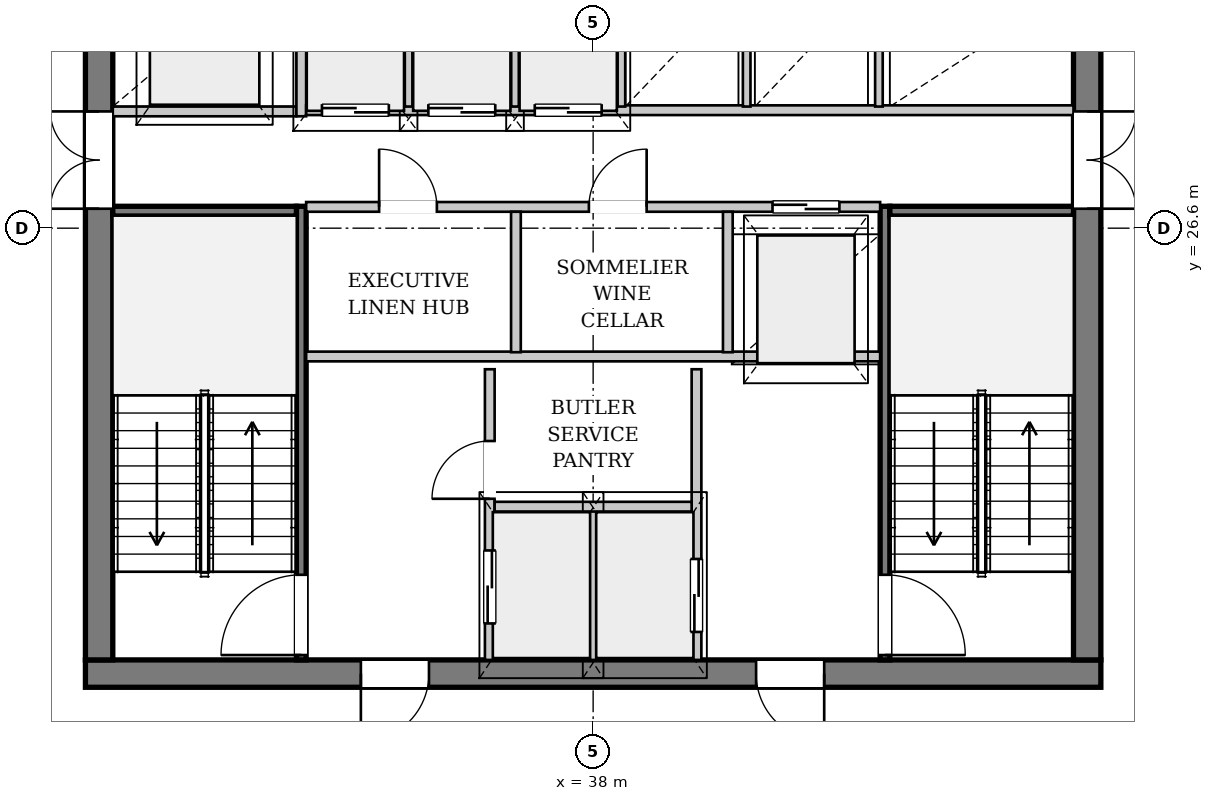
"""IFC4 building model, lengths in metres.
Left out: names, types, materials, properties, quantities, classifications, styles, units other than length and angle.
Written with IfcOpenShell. Run it as: python <this file> out.ifc"""

import sys

from ifc_helpers import new_model, si_unit, direction, frame, frame_2d, origin, place, context, subcontext, project, spatial, rectangle, extrude, source, transform, mapped, element, fill, save


model = new_model("IFC4")
c1 = context("Model", 3, precision=1e-05, world=origin(), true_north=direction((0.0, 1.0)))
c2 = subcontext(c1, "Body", "Model", "MODEL_VIEW")
j1 = project(units=[si_unit("LENGTHUNIT", "METRE"), si_unit("PLANEANGLEUNIT", "RADIAN")], contexts=[c1])
p1 = place(None, origin())
s1 = spatial("IfcSite", under=j1, at=p1, CompositionType="ELEMENT")
p2 = place(p1, origin())
s2 = spatial("IfcBuilding", under=s1, at=p2, CompositionType="ELEMENT")
p3 = place(p2, frame((0.0, 0.0, 241.7)))
s3 = spatial("IfcBuildingStorey", under=s2, at=p3, CompositionType="ELEMENT", Elevation=241.7)
p4 = place(p3, frame((52.382, 25.451, 0.0), z_axis=(0.0, 0.0, 1.0), x_axis=(-0.354101826289, -0.935206873702, 0.0)))
e1 = element("IfcWall", 1, at=p4, inside=s3, PredefinedType="SOLIDWALL", context=c2, shape_type="SweptSolid", body=[
    extrude(rectangle(XDim=22.732, YDim=0.32, at=frame_2d((11.366, 0.0))), origin(), (0.0, 0.0, 1.0), 2.872),
])
p5 = place(p4, frame((6.524, 0.0, 0.0)))
e2 = element("IfcOpeningElement", 2, at=p5, cuts=e1, PredefinedType="OPENING", context=c2, shape_type="SweptSolid", body=[
    extrude(rectangle(XDim=1.5, YDim=2.3, at=frame_2d((0.75, 1.15))), frame((0.0, 0.17, 0.0), z_axis=(0.0, -1.0, 0.0), x_axis=(1.0, 0.0, 0.0)), (0.0, 0.0, 1.0), 0.34),
])
p6 = place(p4, frame((15.521, 0.0, 0.402)))
e3 = element("IfcOpeningElement", 3, at=p6, cuts=e1, PredefinedType="OPENING", context=c2, shape_type="SweptSolid", body=[
    extrude(rectangle(XDim=2.6, YDim=2.35, at=frame_2d((1.3, 1.175))), frame((0.0, 0.17, 0.0), z_axis=(0.0, -1.0, 0.0), x_axis=(1.0, 0.0, 0.0)), (0.0, 0.0, 1.0), 0.34),
])
p7 = place(p3, frame((15.555, 29.152, 0.0), z_axis=(0.0, 0.0, 1.0), x_axis=(0.848386889954, 0.52937669476, 0.0)))
e4 = element("IfcWall", 4, at=p7, inside=s3, PredefinedType="SOLIDWALL", context=c2, shape_type="SweptSolid", body=[
    extrude(rectangle(XDim=22.188, YDim=0.38, at=frame_2d((11.094, 0.0))), origin(), (0.0, 0.0, 1.0), 2.872),
])
p8 = place(p7, frame((5.113, 0.0, 0.502)))
e5 = element("IfcOpeningElement", 5, at=p8, cuts=e4, PredefinedType="OPENING", context=c2, shape_type="SweptSolid", body=[
    extrude(rectangle(XDim=2.2, YDim=2.25, at=frame_2d((1.1, 1.125))), frame((0.0, 0.2, 0.0), z_axis=(0.0, -1.0, 0.0), x_axis=(1.0, 0.0, 0.0)), (0.0, 0.0, 1.0), 0.4),
])
p9 = place(p7, frame((14.876, 0.0, 0.502)))
e6 = element("IfcOpeningElement", 6, at=p9, cuts=e4, PredefinedType="OPENING", context=c2, shape_type="SweptSolid", body=[
    extrude(rectangle(XDim=2.2, YDim=2.25, at=frame_2d((1.1, 1.125))), frame((0.0, 0.2, 0.0), z_axis=(0.0, -1.0, 0.0), x_axis=(1.0, 0.0, 0.0)), (0.0, 0.0, 1.0), 0.4),
])
p10 = place(p3, frame((45.465, 4.559, 0.0), z_axis=(0.0, 0.0, 1.0), x_axis=(0.349367033566, 0.93698595286, 0.0)))
e7 = element("IfcWall", 7, at=p10, inside=s3, PredefinedType="PARAPET", context=c2, shape_type="SweptSolid", body=[
    extrude(rectangle(XDim=20.267, YDim=0.22, at=frame_2d((10.133, 0.0))), origin(), (0.0, 0.0, 1.0), 0.3),
])
p11 = place(p3, frame((46.35, 19.275, 0.0), z_axis=(0.0, 0.0, 1.0), x_axis=(-1.0, 0.0, 0.0)))
e8 = element("IfcWall", 8, at=p11, inside=s3, PredefinedType="SHEAR", context=c2, shape_type="SweptSolid", body=[
    extrude(rectangle(XDim=16.7, YDim=0.45, at=frame_2d((8.35, 0.0))), origin(), (0.0, 0.0, 1.0), 3.38),
])
p12 = place(p11, frame((4.55, 0.0, 0.0)))
e9 = element("IfcOpeningElement", 9, at=p12, cuts=e8, PredefinedType="OPENING", context=c2, shape_type="SweptSolid", body=[
    extrude(rectangle(XDim=1.12, YDim=2.25, at=frame_2d((0.56, 1.125))), frame((0.0, 0.235, 0.0), z_axis=(0.0, -1.0, 0.0), x_axis=(1.0, 0.0, 0.0)), (0.0, 0.0, 1.0), 0.47),
])
p13 = place(p11, frame((11.05, 0.0, 0.0)))
e10 = element("IfcOpeningElement", 10, at=p13, cuts=e8, PredefinedType="OPENING", context=c2, shape_type="SweptSolid", body=[
    extrude(rectangle(XDim=1.12, YDim=2.25, at=frame_2d((0.56, 1.125))), frame((0.0, 0.235, 0.0), z_axis=(0.0, -1.0, 0.0), x_axis=(1.0, 0.0, 0.0)), (0.0, 0.0, 1.0), 0.47),
])
p14 = place(p3, frame((29.875, 19.5, 0.0), z_axis=(0.0, 0.0, 1.0), x_axis=(0.0, 1.0, 0.0)))
e11 = element("IfcWall", 11, at=p14, inside=s3, PredefinedType="SHEAR", context=c2, shape_type="SweptSolid", body=[
    extrude(rectangle(XDim=14.2, YDim=0.45, at=frame_2d((7.1, 0.0))), origin(), (0.0, 0.0, 1.0), 3.38),
])
p15 = place(p14, frame((7.42, 0.0, 0.0)))
e12 = element("IfcOpeningElement", 12, at=p15, cuts=e11, PredefinedType="OPENING", context=c2, shape_type="SweptSolid", body=[
    extrude(rectangle(XDim=1.6, YDim=2.2, at=frame_2d((0.8, 1.1))), frame((0.0, 0.235, 0.0), z_axis=(0.0, -1.0, 0.0), x_axis=(1.0, 0.0, 0.0)), (0.0, 0.0, 1.0), 0.47),
])
p16 = place(p3, frame((46.125, 33.7, 0.0), z_axis=(0.0, 0.0, 1.0), x_axis=(0.0, -1.0, 0.0)))
e13 = element("IfcWall", 13, at=p16, inside=s3, PredefinedType="SHEAR", context=c2, shape_type="SweptSolid", body=[
    extrude(rectangle(XDim=14.2, YDim=0.45, at=frame_2d((7.1, 0.0))), origin(), (0.0, 0.0, 1.0), 3.38),
])
p17 = place(p16, frame((5.18, 0.0, 0.0)))
e14 = element("IfcOpeningElement", 14, at=p17, cuts=e13, PredefinedType="OPENING", context=c2, shape_type="SweptSolid", body=[
    extrude(rectangle(XDim=1.6, YDim=2.2, at=frame_2d((0.8, 1.1))), frame((0.0, 0.235, 0.0), z_axis=(0.0, -1.0, 0.0), x_axis=(1.0, 0.0, 0.0)), (0.0, 0.0, 1.0), 0.47),
])
p18 = place(p16, frame((2.05, 0.0, 0.0)))
e15 = element("IfcOpeningElement", 15, at=p18, cuts=e13, PredefinedType="OPENING", context=c2, shape_type="SweptSolid", body=[
    extrude(rectangle(XDim=0.95, YDim=2.1, at=frame_2d((0.475, 1.05))), frame((0.0, 0.235, 0.0), z_axis=(0.0, -1.0, 0.0), x_axis=(1.0, 0.0, 0.0)), (0.0, 0.0, 1.0), 0.47),
])
p19 = place(p3, frame((33.2, 19.5, 0.0), z_axis=(0.0, 0.0, 1.0), x_axis=(0.0, 1.0, 0.0)))
e16 = element("IfcWall", 16, at=p19, inside=s3, PredefinedType="PARTITIONING", context=c2, shape_type="SweptSolid", body=[
    extrude(rectangle(XDim=7.46, YDim=0.16, at=frame_2d((3.73, 0.0))), origin(), (0.0, 0.0, 1.0), 3.38),
])
p20 = place(p19, frame((0.08, 0.0, 0.0)))
e17 = element("IfcOpeningElement", 17, at=p20, cuts=e16, PredefinedType="OPENING", context=c2, shape_type="SweptSolid", body=[
    extrude(rectangle(XDim=1.32, YDim=2.2, at=frame_2d((0.66, 1.1))), frame((0.0, 0.09, 0.0), z_axis=(0.0, -1.0, 0.0), x_axis=(1.0, 0.0, 0.0)), (0.0, 0.0, 1.0), 0.18),
])
p21 = place(p3, frame((30.1, 26.88, 0.0), z_axis=(0.0, 0.0, 1.0), x_axis=(1.0, 0.0, 0.0)))
e18 = element("IfcWall", 18, at=p21, inside=s3, PredefinedType="PARTITIONING", context=c2, shape_type="SweptSolid", body=[
    extrude(rectangle(XDim=3.02, YDim=0.16, at=frame_2d((1.51, 0.0))), origin(), (0.0, 0.0, 1.0), 3.38),
])
p22 = place(p3, frame((42.8, 26.96, 0.0), z_axis=(0.0, 0.0, 1.0), x_axis=(0.0, -1.0, 0.0)))
e19 = element("IfcWall", 19, at=p22, inside=s3, PredefinedType="PARTITIONING", context=c2, shape_type="SweptSolid", body=[
    extrude(rectangle(XDim=7.46, YDim=0.16, at=frame_2d((3.73, 0.0))), origin(), (0.0, 0.0, 1.0), 3.38),
])
p23 = place(p22, frame((6.06, 0.0, 0.0)))
e20 = element("IfcOpeningElement", 20, at=p23, cuts=e19, PredefinedType="OPENING", context=c2, shape_type="SweptSolid", body=[
    extrude(rectangle(XDim=1.32, YDim=2.2, at=frame_2d((0.66, 1.1))), frame((0.0, 0.09, 0.0), z_axis=(0.0, -1.0, 0.0), x_axis=(1.0, 0.0, 0.0)), (0.0, 0.0, 1.0), 0.18),
])
p24 = place(p3, frame((42.88, 26.88, 0.0), z_axis=(0.0, 0.0, 1.0), x_axis=(1.0, 0.0, 0.0)))
e21 = element("IfcWall", 21, at=p24, inside=s3, PredefinedType="PARTITIONING", context=c2, shape_type="SweptSolid", body=[
    extrude(rectangle(XDim=3.02, YDim=0.16, at=frame_2d((1.51, 0.0))), origin(), (0.0, 0.0, 1.0), 3.38),
])
p25 = place(p3, frame((36.3, 19.5, 0.0), z_axis=(0.0, 0.0, 1.0), x_axis=(0.0, 1.0, 0.0)))
e22 = element("IfcWall", 22, at=p25, inside=s3, PredefinedType="PARTITIONING", context=c2, shape_type="SweptSolid", body=[
    extrude(rectangle(XDim=4.78, YDim=0.16, at=frame_2d((2.39, 0.0))), origin(), (0.0, 0.0, 1.0), 3.38),
])
p26 = place(p25, frame((0.6, 0.0, 0.0)))
e23 = element("IfcOpeningElement", 23, at=p26, cuts=e22, PredefinedType="OPENING", context=c2, shape_type="SweptSolid", body=[
    extrude(rectangle(XDim=1.2, YDim=2.2, at=frame_2d((0.6, 1.1))), frame((0.0, 0.09, 0.0), z_axis=(0.0, -1.0, 0.0), x_axis=(1.0, 0.0, 0.0)), (0.0, 0.0, 1.0), 0.18),
])
p27 = place(p25, frame((2.65, 0.0, 0.0)))
e24 = element("IfcOpeningElement", 24, at=p27, cuts=e22, PredefinedType="OPENING", context=c2, shape_type="SweptSolid", body=[
    extrude(rectangle(XDim=0.95, YDim=2.1, at=frame_2d((0.475, 1.05))), frame((0.0, 0.09, 0.0), z_axis=(0.0, -1.0, 0.0), x_axis=(1.0, 0.0, 0.0)), (0.0, 0.0, 1.0), 0.18),
])
p28 = place(p3, frame((39.7, 24.28, 0.0), z_axis=(0.0, 0.0, 1.0), x_axis=(0.0, -1.0, 0.0)))
e25 = element("IfcWall", 25, at=p28, inside=s3, PredefinedType="PARTITIONING", context=c2, shape_type="SweptSolid", body=[
    extrude(rectangle(XDim=4.78, YDim=0.16, at=frame_2d((2.39, 0.0))), origin(), (0.0, 0.0, 1.0), 3.38),
])
p29 = place(p28, frame((3.12, 0.0, 0.0)))
e26 = element("IfcOpeningElement", 26, at=p29, cuts=e25, PredefinedType="OPENING", context=c2, shape_type="SweptSolid", body=[
    extrude(rectangle(XDim=1.2, YDim=2.2, at=frame_2d((0.6, 1.1))), frame((0.0, 0.09, 0.0), z_axis=(0.0, -1.0, 0.0), x_axis=(1.0, 0.0, 0.0)), (0.0, 0.0, 1.0), 0.18),
])
p30 = place(p3, frame((38.0, 19.5, 0.0), z_axis=(0.0, 0.0, 1.0), x_axis=(0.0, 1.0, 0.0)))
e27 = element("IfcWall", 27, at=p30, inside=s3, PredefinedType="PARTITIONING", context=c2, shape_type="SweptSolid", body=[
    extrude(rectangle(XDim=2.46, YDim=0.125, at=frame_2d((1.23, 0.0))), origin(), (0.0, 0.0, 1.0), 3.38),
])
p31 = place(p3, frame((36.38, 22.02, 0.0), z_axis=(0.0, 0.0, 1.0), x_axis=(1.0, 0.0, 0.0)))
e28 = element("IfcWall", 28, at=p31, inside=s3, PredefinedType="PARTITIONING", context=c2, shape_type="SweptSolid", body=[
    extrude(rectangle(XDim=3.24, YDim=0.16, at=frame_2d((1.62, 0.0))), origin(), (0.0, 0.0, 1.0), 3.38),
])
p32 = place(p3, frame((33.28, 24.49, 0.0), z_axis=(0.0, 0.0, 1.0), x_axis=(1.0, 0.0, 0.0)))
e29 = element("IfcWall", 29, at=p32, inside=s3, PredefinedType="PARTITIONING", context=c2, shape_type="SweptSolid", body=[
    extrude(rectangle(XDim=9.44, YDim=0.16, at=frame_2d((4.72, 0.0))), origin(), (0.0, 0.0, 1.0), 3.38),
])
p33 = place(p3, frame((30.1, 28.52, 0.0), z_axis=(0.0, 0.0, 1.0), x_axis=(1.0, 0.0, 0.0)))
e30 = element("IfcWall", 30, at=p33, inside=s3, PredefinedType="PARTITIONING", context=c2, shape_type="SweptSolid", body=[
    extrude(rectangle(XDim=3.02, YDim=0.16, at=frame_2d((1.51, 0.0))), origin(), (0.0, 0.0, 1.0), 3.38),
])
p34 = place(p3, frame((33.2, 28.44, 0.0), z_axis=(0.0, 0.0, 1.0), x_axis=(0.0, 1.0, 0.0)))
e31 = element("IfcWall", 31, at=p34, inside=s3, PredefinedType="PARTITIONING", context=c2, shape_type="SweptSolid", body=[
    extrude(rectangle(XDim=5.26, YDim=0.16, at=frame_2d((2.63, 0.0))), origin(), (0.0, 0.0, 1.0), 3.38),
])
p35 = place(p3, frame((33.28, 26.95, 0.0), z_axis=(0.0, 0.0, 1.0), x_axis=(1.0, 0.0, 0.0)))
e32 = element("IfcWall", 32, at=p35, inside=s3, PredefinedType="PARTITIONING", context=c2, shape_type="SweptSolid", body=[
    extrude(rectangle(XDim=9.44, YDim=0.16, at=frame_2d((4.72, 0.0))), origin(), (0.0, 0.0, 1.0), 3.38),
])
p36 = place(p35, frame((1.2, 0.0, 0.0)))
e33 = element("IfcOpeningElement", 33, at=p36, cuts=e32, PredefinedType="OPENING", context=c2, shape_type="SweptSolid", body=[
    extrude(rectangle(XDim=0.95, YDim=2.1, at=frame_2d((0.475, 1.05))), frame((0.0, 0.09, 0.0), z_axis=(0.0, -1.0, 0.0), x_axis=(1.0, 0.0, 0.0)), (0.0, 0.0, 1.0), 0.18),
])
p37 = place(p35, frame((4.65, 0.0, 0.0)))
e34 = element("IfcOpeningElement", 34, at=p37, cuts=e32, PredefinedType="OPENING", context=c2, shape_type="SweptSolid", body=[
    extrude(rectangle(XDim=0.95, YDim=2.1, at=frame_2d((0.475, 1.05))), frame((0.0, 0.09, 0.0), z_axis=(0.0, -1.0, 0.0), x_axis=(1.0, 0.0, 0.0)), (0.0, 0.0, 1.0), 0.18),
])
p38 = place(p35, frame((7.67, 0.0, 0.0)))
e35 = element("IfcOpeningElement", 35, at=p38, cuts=e32, PredefinedType="OPENING", context=c2, shape_type="SweptSolid", body=[
    extrude(rectangle(XDim=1.1, YDim=2.2, at=frame_2d((0.55, 1.1))), frame((0.0, 0.09, 0.0), z_axis=(0.0, -1.0, 0.0), x_axis=(1.0, 0.0, 0.0)), (0.0, 0.0, 1.0), 0.18),
])
for number, where, z_axis, x_axis in (
    (36, (36.73, 24.56, 0.0), (0.0, 0.0, 1.0), (0.0, 1.0, 0.0)),
    (37, (40.215, 24.56, 0.0), (0.0, 0.0, 1.0), (0.0, 1.0, 0.0)),
):
    element("IfcWall", number, at=place(p3, frame(where, z_axis=z_axis, x_axis=x_axis)), inside=s3, PredefinedType="PARTITIONING", context=c2, shape_type="SweptSolid", body=[
        extrude(rectangle(XDim=2.31, YDim=0.16, at=frame_2d((1.155, 0.0))), origin(), (0.0, 0.0, 1.0), 3.38),
    ])
p39 = place(p3, frame((33.28, 28.54, 0.0), z_axis=(0.0, 0.0, 1.0), x_axis=(1.0, 0.0, 0.0)))
e38 = element("IfcWall", 38, at=p39, inside=s3, PredefinedType="PARTITIONING", context=c2, shape_type="SweptSolid", body=[
    extrude(rectangle(XDim=12.62, YDim=0.16, at=frame_2d((6.31, 0.0))), origin(), (0.0, 0.0, 1.0), 3.38),
])
p40 = place(p39, frame((0.26, 0.0, 0.0)))
e39 = element("IfcOpeningElement", 39, at=p40, cuts=e38, PredefinedType="OPENING", context=c2, shape_type="SweptSolid", body=[
    extrude(rectangle(XDim=1.1, YDim=2.2, at=frame_2d((0.55, 1.1))), frame((0.0, 0.09, 0.0), z_axis=(0.0, -1.0, 0.0), x_axis=(1.0, 0.0, 0.0)), (0.0, 0.0, 1.0), 0.18),
])
p41 = place(p39, frame((2.01, 0.0, 0.0)))
e40 = element("IfcOpeningElement", 40, at=p41, cuts=e38, PredefinedType="OPENING", context=c2, shape_type="SweptSolid", body=[
    extrude(rectangle(XDim=1.1, YDim=2.2, at=frame_2d((0.55, 1.1))), frame((0.0, 0.09, 0.0), z_axis=(0.0, -1.0, 0.0), x_axis=(1.0, 0.0, 0.0)), (0.0, 0.0, 1.0), 0.18),
])
p42 = place(p39, frame((3.76, 0.0, 0.0)))
e41 = element("IfcOpeningElement", 41, at=p42, cuts=e38, PredefinedType="OPENING", context=c2, shape_type="SweptSolid", body=[
    extrude(rectangle(XDim=1.1, YDim=2.2, at=frame_2d((0.55, 1.1))), frame((0.0, 0.09, 0.0), z_axis=(0.0, -1.0, 0.0), x_axis=(1.0, 0.0, 0.0)), (0.0, 0.0, 1.0), 0.18),
])
for number, where, z_axis, x_axis in (
    (42, (34.965, 28.6, 0.0), (0.0, 0.0, 1.0), (0.0, 1.0, 0.0)),
    (43, (36.715, 28.6, 0.0), (0.0, 0.0, 1.0), (0.0, 1.0, 0.0)),
    (44, (38.465, 28.6, 0.0), (0.0, 0.0, 1.0), (0.0, 1.0, 0.0)),
    (45, (40.525, 28.6, 0.0), (0.0, 0.0, 1.0), (0.0, 1.0, 0.0)),
    (46, (42.7, 28.6, 0.0), (0.0, 0.0, 1.0), (0.0, 1.0, 0.0)),
):
    element("IfcWall", number, at=place(p3, frame(where, z_axis=z_axis, x_axis=x_axis)), inside=s3, PredefinedType="PARTITIONING", context=c2, shape_type="SweptSolid", body=[
        extrude(rectangle(XDim=1.92, YDim=0.125, at=frame_2d((0.96, 0.0))), origin(), (0.0, 0.0, 1.0), 3.38),
    ])
m1 = source(origin(), c2, "Body", "SweptSolid", [
    extrude(rectangle(XDim=1.12, YDim=2.25, at=frame_2d((0.56, 1.125))), frame((0.0, 0.025, 0.0), z_axis=(0.0, -1.0, 0.0), x_axis=(1.0, 0.0, 0.0)), (0.0, 0.0, 1.0), 0.05),
])
p43 = place(p12, origin())
e47 = element("IfcDoor", 47, at=p43, inside=s3, OperationType="SINGLE_SWING_LEFT", PredefinedType="DOOR", context=c2, shape_type="MappedRepresentation", body=[
    mapped(m1, transform((0.0, 0.0, 0.0), x_axis=(1.0, 0.0, 0.0), y_axis=(0.0, 1.0, 0.0), z_axis=(0.0, 0.0, 1.0), scale=1.0)),
])
fill(e9, e47)
p44 = place(p13, origin())
e48 = element("IfcDoor", 48, at=p44, inside=s3, OperationType="SINGLE_SWING_RIGHT", PredefinedType="DOOR", context=c2, shape_type="MappedRepresentation", body=[
    mapped(m1, transform((0.0, 0.0, 0.0), x_axis=(1.0, 0.0, 0.0), y_axis=(0.0, 1.0, 0.0), z_axis=(0.0, 0.0, 1.0), scale=1.0)),
])
fill(e10, e48)
m2 = source(origin(), c2, "Body", "SweptSolid", [
    extrude(rectangle(XDim=1.6, YDim=2.2, at=frame_2d((0.8, 1.1))), frame((0.0, 0.025, 0.0), z_axis=(0.0, -1.0, 0.0), x_axis=(1.0, 0.0, 0.0)), (0.0, 0.0, 1.0), 0.05),
])
p45 = place(p15, origin())
e49 = element("IfcDoor", 49, at=p45, inside=s3, OperationType="DOUBLE_DOOR_SINGLE_SWING", PredefinedType="DOOR", context=c2, shape_type="MappedRepresentation", body=[
    mapped(m2, transform((0.0, 0.0, 0.0), x_axis=(1.0, 0.0, 0.0), y_axis=(0.0, 1.0, 0.0), z_axis=(0.0, 0.0, 1.0), scale=1.0)),
])
fill(e12, e49)
p46 = place(p17, origin())
e50 = element("IfcDoor", 50, at=p46, inside=s3, OperationType="DOUBLE_DOOR_SINGLE_SWING", PredefinedType="DOOR", context=c2, shape_type="MappedRepresentation", body=[
    mapped(m2, transform((0.0, 0.0, 0.0), x_axis=(1.0, 0.0, 0.0), y_axis=(0.0, 1.0, 0.0), z_axis=(0.0, 0.0, 1.0), scale=1.0)),
])
fill(e14, e50)
m3 = source(origin(), c2, "Body", "SweptSolid", [
    extrude(rectangle(XDim=1.32, YDim=2.2, at=frame_2d((0.66, 1.1))), frame((0.0, 0.025, 0.0), z_axis=(0.0, -1.0, 0.0), x_axis=(1.0, 0.0, 0.0)), (0.0, 0.0, 1.0), 0.05),
])
p47 = place(p20, origin())
e51 = element("IfcDoor", 51, at=p47, inside=s3, OperationType="SINGLE_SWING_LEFT", PredefinedType="DOOR", context=c2, shape_type="MappedRepresentation", body=[
    mapped(m3, transform((0.0, 0.0, 0.0), x_axis=(1.0, 0.0, 0.0), y_axis=(0.0, 1.0, 0.0), z_axis=(0.0, 0.0, 1.0), scale=1.0)),
])
fill(e17, e51)
p48 = place(p23, origin())
e52 = element("IfcDoor", 52, at=p48, inside=s3, OperationType="SINGLE_SWING_RIGHT", PredefinedType="DOOR", context=c2, shape_type="MappedRepresentation", body=[
    mapped(m3, transform((0.0, 0.0, 0.0), x_axis=(1.0, 0.0, 0.0), y_axis=(0.0, 1.0, 0.0), z_axis=(0.0, 0.0, 1.0), scale=1.0)),
])
fill(e20, e52)
m4 = source(origin(), c2, "Body", "SweptSolid", [
    extrude(rectangle(XDim=1.2, YDim=2.2, at=frame_2d((0.6, 1.1))), frame((0.0, 0.025, 0.0), z_axis=(0.0, -1.0, 0.0), x_axis=(1.0, 0.0, 0.0)), (0.0, 0.0, 1.0), 0.05),
])
p49 = place(p26, origin())
e53 = element("IfcDoor", 53, at=p49, inside=s3, OperationType="DOUBLE_DOOR_SLIDING", PredefinedType="DOOR", context=c2, shape_type="MappedRepresentation", body=[
    mapped(m4, transform((0.0, 0.0, 0.0), x_axis=(1.0, 0.0, 0.0), y_axis=(0.0, 1.0, 0.0), z_axis=(0.0, 0.0, 1.0), scale=1.0)),
])
fill(e23, e53)
m5 = source(origin(), c2, "Body", "SweptSolid", [
    extrude(rectangle(XDim=0.95, YDim=2.1, at=frame_2d((0.475, 1.05))), frame((0.0, 0.025, 0.0), z_axis=(0.0, -1.0, 0.0), x_axis=(1.0, 0.0, 0.0)), (0.0, 0.0, 1.0), 0.05),
])
p50 = place(p27, origin())
e54 = element("IfcDoor", 54, at=p50, inside=s3, OperationType="SINGLE_SWING_LEFT", PredefinedType="DOOR", context=c2, shape_type="MappedRepresentation", body=[
    mapped(m5, transform((0.0, 0.0, 0.0), x_axis=(1.0, 0.0, 0.0), y_axis=(0.0, 1.0, 0.0), z_axis=(0.0, 0.0, 1.0), scale=1.0)),
])
fill(e24, e54)
p51 = place(p29, origin())
e55 = element("IfcDoor", 55, at=p51, inside=s3, OperationType="DOUBLE_DOOR_SLIDING", PredefinedType="DOOR", context=c2, shape_type="MappedRepresentation", body=[
    mapped(m4, transform((0.0, 0.0, 0.0), x_axis=(1.0, 0.0, 0.0), y_axis=(0.0, 1.0, 0.0), z_axis=(0.0, 0.0, 1.0), scale=1.0)),
])
fill(e26, e55)
p52 = place(p36, origin())
e56 = element("IfcDoor", 56, at=p52, inside=s3, OperationType="SINGLE_SWING_LEFT", PredefinedType="DOOR", context=c2, shape_type="MappedRepresentation", body=[
    mapped(m5, transform((0.0, 0.0, 0.0), x_axis=(1.0, 0.0, 0.0), y_axis=(0.0, 1.0, 0.0), z_axis=(0.0, 0.0, 1.0), scale=1.0)),
])
fill(e33, e56)
p53 = place(p37, origin())
e57 = element("IfcDoor", 57, at=p53, inside=s3, OperationType="SINGLE_SWING_RIGHT", PredefinedType="DOOR", context=c2, shape_type="MappedRepresentation", body=[
    mapped(m5, transform((0.0, 0.0, 0.0), x_axis=(1.0, 0.0, 0.0), y_axis=(0.0, 1.0, 0.0), z_axis=(0.0, 0.0, 1.0), scale=1.0)),
])
fill(e34, e57)
m6 = source(origin(), c2, "Body", "SweptSolid", [
    extrude(rectangle(XDim=1.1, YDim=2.2, at=frame_2d((0.55, 1.1))), frame((0.0, 0.025, 0.0), z_axis=(0.0, -1.0, 0.0), x_axis=(1.0, 0.0, 0.0)), (0.0, 0.0, 1.0), 0.05),
])
p54 = place(p38, origin())
e58 = element("IfcDoor", 58, at=p54, inside=s3, OperationType="DOUBLE_DOOR_SLIDING", PredefinedType="DOOR", context=c2, shape_type="MappedRepresentation", body=[
    mapped(m6, transform((0.0, 0.0, 0.0), x_axis=(1.0, 0.0, 0.0), y_axis=(0.0, 1.0, 0.0), z_axis=(0.0, 0.0, 1.0), scale=1.0)),
])
fill(e35, e58)
p55 = place(p40, origin())
e59 = element("IfcDoor", 59, at=p55, inside=s3, OperationType="DOUBLE_DOOR_SLIDING", PredefinedType="DOOR", context=c2, shape_type="MappedRepresentation", body=[
    mapped(m6, transform((0.0, 0.0, 0.0), x_axis=(1.0, 0.0, 0.0), y_axis=(0.0, 1.0, 0.0), z_axis=(0.0, 0.0, 1.0), scale=1.0)),
])
fill(e39, e59)
p56 = place(p41, origin())
e60 = element("IfcDoor", 60, at=p56, inside=s3, OperationType="DOUBLE_DOOR_SLIDING", PredefinedType="DOOR", context=c2, shape_type="MappedRepresentation", body=[
    mapped(m6, transform((0.0, 0.0, 0.0), x_axis=(1.0, 0.0, 0.0), y_axis=(0.0, 1.0, 0.0), z_axis=(0.0, 0.0, 1.0), scale=1.0)),
])
fill(e40, e60)
p57 = place(p42, origin())
e61 = element("IfcDoor", 61, at=p57, inside=s3, OperationType="DOUBLE_DOOR_SLIDING", PredefinedType="DOOR", context=c2, shape_type="MappedRepresentation", body=[
    mapped(m6, transform((0.0, 0.0, 0.0), x_axis=(1.0, 0.0, 0.0), y_axis=(0.0, 1.0, 0.0), z_axis=(0.0, 0.0, 1.0), scale=1.0)),
])
fill(e41, e61)
save(model, sys.argv[1])
